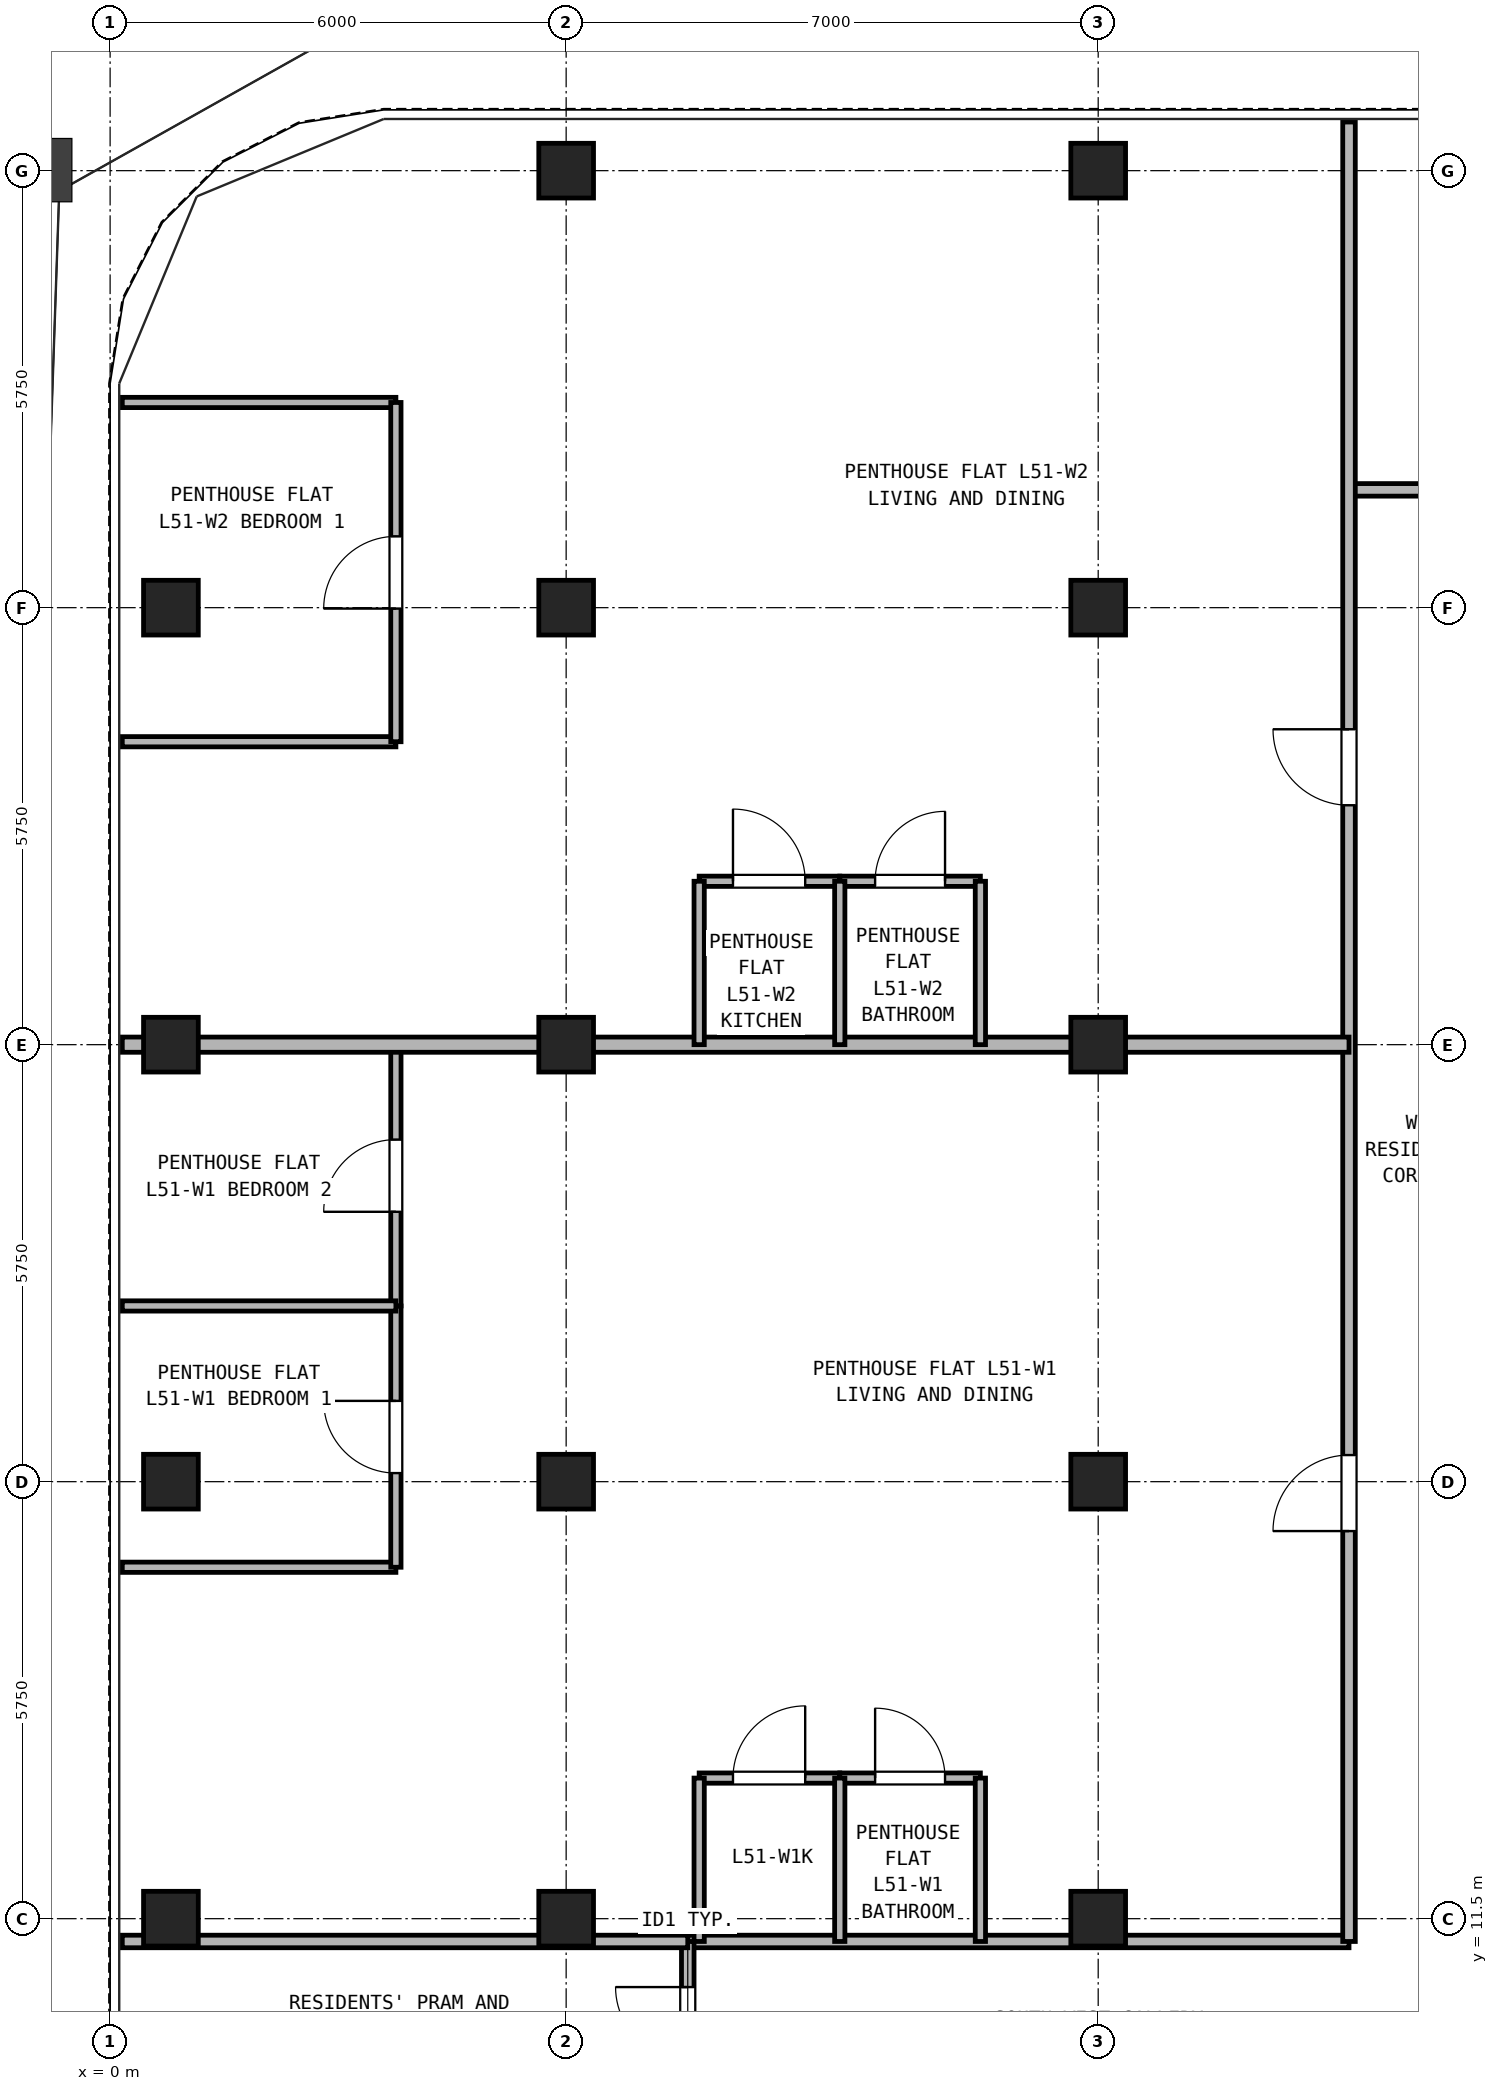
"""IFC4 building model, lengths in metres.
Left out: names, types, materials, properties, quantities, classifications, styles, units other than length and angle.
Written with IfcOpenShell. Run it as: python <this file> out.ifc"""

import sys

from ifc_helpers import new_model, si_unit, direction, frame, frame_2d, origin, origin_2d, place, context, subcontext, project, spatial, rectangle, hollow_rectangle, extrude, source, transform, mapped, element, fill, save


model = new_model("IFC4")
c1 = context("Model", 3, precision=1e-05, world=origin(), true_north=direction((0.0, 1.0)))
c2 = subcontext(c1, "Body", "Model", "MODEL_VIEW")
j1 = project(units=[si_unit("LENGTHUNIT", "METRE"), si_unit("PLANEANGLEUNIT", "RADIAN")], contexts=[c1])
p1 = place(None, origin())
s1 = spatial("IfcSite", under=j1, at=p1, CompositionType="ELEMENT")
p2 = place(p1, origin())
s2 = spatial("IfcBuilding", under=s1, at=p2, CompositionType="ELEMENT")
p3 = place(p2, frame((0.0, 0.0, 181.7)))
s3 = spatial("IfcBuildingStorey", under=s2, at=p3, CompositionType="ELEMENT", Elevation=181.7)
m1 = source(origin(), c2, "Body", "SweptSolid", [
    extrude(hollow_rectangle(XDim=0.72, YDim=0.72, WallThickness=0.04, at=origin_2d()), origin(), (0.0, 0.0, 1.0), 2.95),
])
for number, where, z_axis, x_axis in (
    (1, (6.0, 34.5, 0.0), (0.0, 0.0, 1.0), (1.0, 0.0, 0.0)),
    (2, (13.0, 34.5, 0.0), (0.0, 0.0, 1.0), (1.0, 0.0, 0.0)),
    (3, (0.8, 11.5, 0.0), (0.0, 0.0, 1.0), (1.0, 0.0, 0.0)),
    (4, (0.8, 17.25, 0.0), (0.0, 0.0, 1.0), (1.0, 0.0, 0.0)),
    (5, (0.8, 23.0, 0.0), (0.0, 0.0, 1.0), (1.0, 0.0, 0.0)),
    (6, (0.8, 28.75, 0.0), (0.0, 0.0, 1.0), (1.0, 0.0, 0.0)),
    (7, (6.0, 11.5, 0.0), (0.0, 0.0, 1.0), (1.0, 0.0, 0.0)),
    (8, (6.0, 17.25, 0.0), (0.0, 0.0, 1.0), (1.0, 0.0, 0.0)),
    (9, (6.0, 23.0, 0.0), (0.0, 0.0, 1.0), (1.0, 0.0, 0.0)),
    (10, (6.0, 28.75, 0.0), (0.0, 0.0, 1.0), (1.0, 0.0, 0.0)),
    (11, (13.0, 11.5, 0.0), (0.0, 0.0, 1.0), (1.0, 0.0, 0.0)),
    (12, (13.0, 17.25, 0.0), (0.0, 0.0, 1.0), (1.0, 0.0, 0.0)),
    (13, (13.0, 23.0, 0.0), (0.0, 0.0, 1.0), (1.0, 0.0, 0.0)),
    (14, (13.0, 28.75, 0.0), (0.0, 0.0, 1.0), (1.0, 0.0, 0.0)),
):
    element("IfcColumn", number, at=place(p3, frame(where, z_axis=z_axis, x_axis=x_axis)), inside=s3, PredefinedType="COLUMN", context=c2, shape_type="MappedRepresentation", body=[
        mapped(m1, transform((0.0, 0.0, 0.0), x_axis=(1.0, 0.0, 0.0), y_axis=(0.0, 1.0, 0.0), z_axis=(0.0, 0.0, 1.0), scale=1.0)),
    ])
p4 = place(p3, frame((7.6, 11.2, 0.0), z_axis=(0.0, 0.0, 1.0), x_axis=(1.0, 0.0, 0.0)))
e15 = element("IfcWall", 15, at=p4, inside=s3, PredefinedType="PARTITIONING", context=c2, shape_type="SweptSolid", body=[
    extrude(rectangle(XDim=8.7, YDim=0.165, at=frame_2d((4.35, 0.0))), origin(), (0.0, 0.0, 1.0), 2.95),
])
p5 = place(p3, frame((7.6, 9.2, 0.0), z_axis=(0.0, 0.0, 1.0), x_axis=(0.0, 1.0, 0.0)))
e16 = element("IfcWall", 16, at=p5, inside=s3, PredefinedType="PARTITIONING", context=c2, shape_type="SweptSolid", body=[
    extrude(rectangle(XDim=2.0, YDim=0.165, at=frame_2d((1.0, 0.0))), origin(), (0.0, 0.0, 1.0), 2.95),
])
p6 = place(p5, frame((0.45, 0.0, 0.0)))
e17 = element("IfcOpeningElement", 17, at=p6, cuts=e16, PredefinedType="OPENING", context=c2, shape_type="SweptSolid", body=[
    extrude(rectangle(XDim=0.95, YDim=2.15, at=frame_2d((0.475, 1.075))), frame((0.0, 0.093, 0.0), z_axis=(0.0, -1.0, 0.0), x_axis=(1.0, 0.0, 0.0)), (0.0, 0.0, 1.0), 0.185),
])
p7 = place(p3, frame((16.3, 30.3, 0.0), z_axis=(0.0, 0.0, 1.0), x_axis=(1.0, 0.0, 0.0)))
e18 = element("IfcWall", 18, at=p7, inside=s3, PredefinedType="PARTITIONING", context=c2, shape_type="SweptSolid", body=[
    extrude(rectangle(XDim=14.4, YDim=0.165, at=frame_2d((7.2, 0.0))), origin(), (0.0, 0.0, 1.0), 2.95),
])
p8 = place(p7, frame((3.1, 0.0, 0.0)))
e19 = element("IfcOpeningElement", 19, at=p8, cuts=e18, PredefinedType="OPENING", context=c2, shape_type="SweptSolid", body=[
    extrude(rectangle(XDim=0.95, YDim=2.15, at=frame_2d((0.475, 1.075))), frame((0.0, 0.093, 0.0), z_axis=(0.0, -1.0, 0.0), x_axis=(1.0, 0.0, 0.0)), (0.0, 0.0, 1.0), 0.185),
])
p9 = place(p7, frame((8.0, 0.0, 0.0)))
e20 = element("IfcOpeningElement", 20, at=p9, cuts=e18, PredefinedType="OPENING", context=c2, shape_type="SweptSolid", body=[
    extrude(rectangle(XDim=0.95, YDim=2.15, at=frame_2d((0.475, 1.075))), frame((0.0, 0.093, 0.0), z_axis=(0.0, -1.0, 0.0), x_axis=(1.0, 0.0, 0.0)), (0.0, 0.0, 1.0), 0.185),
])
p10 = place(p7, frame((10.8, 0.0, 0.0)))
e21 = element("IfcOpeningElement", 21, at=p10, cuts=e18, PredefinedType="OPENING", context=c2, shape_type="SweptSolid", body=[
    extrude(rectangle(XDim=0.92, YDim=2.1, at=frame_2d((0.46, 1.05))), frame((0.0, 0.093, 0.0), z_axis=(0.0, -1.0, 0.0), x_axis=(1.0, 0.0, 0.0)), (0.0, 0.0, 1.0), 0.185),
])
p11 = place(p3, frame((16.3, 11.2, 0.0), z_axis=(0.0, 0.0, 1.0), x_axis=(0.0, 1.0, 0.0)))
e22 = element("IfcWall", 22, at=p11, inside=s3, PredefinedType="PARTITIONING", context=c2, shape_type="SweptSolid", body=[
    extrude(rectangle(XDim=23.94, YDim=0.165, at=frame_2d((11.97, 0.0))), origin(), (0.0, 0.0, 1.0), 2.95),
])
p12 = place(p11, frame((5.4, 0.0, 0.0)))
e23 = element("IfcOpeningElement", 23, at=p12, cuts=e22, PredefinedType="OPENING", context=c2, shape_type="SweptSolid", body=[
    extrude(rectangle(XDim=1.0, YDim=2.15, at=frame_2d((0.5, 1.075))), frame((0.0, 0.093, 0.0), z_axis=(0.0, -1.0, 0.0), x_axis=(1.0, 0.0, 0.0)), (0.0, 0.0, 1.0), 0.185),
])
p13 = place(p11, frame((14.95, 0.0, 0.0)))
e24 = element("IfcOpeningElement", 24, at=p13, cuts=e22, PredefinedType="OPENING", context=c2, shape_type="SweptSolid", body=[
    extrude(rectangle(XDim=1.0, YDim=2.15, at=frame_2d((0.5, 1.075))), frame((0.0, 0.093, 0.0), z_axis=(0.0, -1.0, 0.0), x_axis=(1.0, 0.0, 0.0)), (0.0, 0.0, 1.0), 0.185),
])
p14 = place(p3, frame((0.16, 11.2, 0.0), z_axis=(0.0, 0.0, 1.0), x_axis=(1.0, 0.0, 0.0)))
e25 = element("IfcWall", 25, at=p14, inside=s3, PredefinedType="PARTITIONING", context=c2, shape_type="SweptSolid", body=[
    extrude(rectangle(XDim=7.44, YDim=0.165, at=frame_2d((3.72, 0.0))), origin(), (0.0, 0.0, 1.0), 2.95),
])
p15 = place(p3, frame((7.75, 13.35, 0.0), z_axis=(0.0, 0.0, 1.0), x_axis=(1.0, 0.0, 0.0)))
e26 = element("IfcWall", 26, at=p15, inside=s3, PredefinedType="PARTITIONING", context=c2, shape_type="SweptSolid", body=[
    extrude(rectangle(XDim=1.85, YDim=0.135, at=frame_2d((0.925, 0.0))), origin(), (0.0, 0.0, 1.0), 2.95),
])
p16 = place(p15, frame((0.445, 0.0, 0.0)))
e27 = element("IfcOpeningElement", 27, at=p16, cuts=e26, PredefinedType="OPENING", context=c2, shape_type="SweptSolid", body=[
    extrude(rectangle(XDim=0.95, YDim=2.15, at=frame_2d((0.475, 1.075))), frame((0.0, 0.077, 0.0), z_axis=(0.0, -1.0, 0.0), x_axis=(1.0, 0.0, 0.0)), (0.0, 0.0, 1.0), 0.155),
])
p17 = place(p3, frame((9.6, 13.35, 0.0), z_axis=(0.0, 0.0, 1.0), x_axis=(1.0, 0.0, 0.0)))
e28 = element("IfcWall", 28, at=p17, inside=s3, PredefinedType="PARTITIONING", context=c2, shape_type="SweptSolid", body=[
    extrude(rectangle(XDim=1.85, YDim=0.135, at=frame_2d((0.925, 0.0))), origin(), (0.0, 0.0, 1.0), 2.95),
])
p18 = place(p17, frame((0.465, 0.0, 0.0)))
e29 = element("IfcOpeningElement", 29, at=p18, cuts=e28, PredefinedType="OPENING", context=c2, shape_type="SweptSolid", body=[
    extrude(rectangle(XDim=0.92, YDim=2.1, at=frame_2d((0.46, 1.05))), frame((0.0, 0.077, 0.0), z_axis=(0.0, -1.0, 0.0), x_axis=(1.0, 0.0, 0.0)), (0.0, 0.0, 1.0), 0.155),
])
for number, where, z_axis, x_axis in (
    (30, (7.75, 11.2, 0.0), (0.0, 0.0, 1.0), (0.0, 1.0, 0.0)),
    (31, (9.6, 11.2, 0.0), (0.0, 0.0, 1.0), (0.0, 1.0, 0.0)),
    (32, (11.45, 11.2, 0.0), (0.0, 0.0, 1.0), (0.0, 1.0, 0.0)),
):
    element("IfcWall", number, at=place(p3, frame(where, z_axis=z_axis, x_axis=x_axis)), inside=s3, PredefinedType="PARTITIONING", context=c2, shape_type="SweptSolid", body=[
        extrude(rectangle(XDim=2.15, YDim=0.135, at=frame_2d((1.075, 0.0))), origin(), (0.0, 0.0, 1.0), 2.95),
    ])
p19 = place(p3, frame((0.16, 16.124, 0.0), z_axis=(0.0, 0.0, 1.0), x_axis=(1.0, 0.0, 0.0)))
e33 = element("IfcWall", 33, at=p19, inside=s3, PredefinedType="PARTITIONING", context=c2, shape_type="SweptSolid", body=[
    extrude(rectangle(XDim=3.6, YDim=0.135, at=frame_2d((1.8, 0.0))), origin(), (0.0, 0.0, 1.0), 2.95),
])
p20 = place(p3, frame((3.76, 16.124, 0.0), z_axis=(0.0, 0.0, 1.0), x_axis=(0.0, 1.0, 0.0)))
e34 = element("IfcWall", 34, at=p20, inside=s3, PredefinedType="PARTITIONING", context=c2, shape_type="SweptSolid", body=[
    extrude(rectangle(XDim=3.438, YDim=0.135, at=frame_2d((1.719, 0.0))), origin(), (0.0, 0.0, 1.0), 2.95),
])
p21 = place(p20, frame((1.239, 0.0, 0.0)))
e35 = element("IfcOpeningElement", 35, at=p21, cuts=e34, PredefinedType="OPENING", context=c2, shape_type="SweptSolid", body=[
    extrude(rectangle(XDim=0.95, YDim=2.15, at=frame_2d((0.475, 1.075))), frame((0.0, 0.077, 0.0), z_axis=(0.0, -1.0, 0.0), x_axis=(1.0, 0.0, 0.0)), (0.0, 0.0, 1.0), 0.155),
])
p22 = place(p3, frame((3.76, 19.562, 0.0), z_axis=(0.0, 0.0, 1.0), x_axis=(0.0, 1.0, 0.0)))
e36 = element("IfcWall", 36, at=p22, inside=s3, PredefinedType="PARTITIONING", context=c2, shape_type="SweptSolid", body=[
    extrude(rectangle(XDim=3.438, YDim=0.135, at=frame_2d((1.719, 0.0))), origin(), (0.0, 0.0, 1.0), 2.95),
])
p23 = place(p22, frame((1.239, 0.0, 0.0)))
e37 = element("IfcOpeningElement", 37, at=p23, cuts=e36, PredefinedType="OPENING", context=c2, shape_type="SweptSolid", body=[
    extrude(rectangle(XDim=0.95, YDim=2.15, at=frame_2d((0.475, 1.075))), frame((0.0, 0.077, 0.0), z_axis=(0.0, -1.0, 0.0), x_axis=(1.0, 0.0, 0.0)), (0.0, 0.0, 1.0), 0.155),
])
p24 = place(p3, frame((0.16, 19.562, 0.0), z_axis=(0.0, 0.0, 1.0), x_axis=(1.0, 0.0, 0.0)))
e38 = element("IfcWall", 38, at=p24, inside=s3, PredefinedType="PARTITIONING", context=c2, shape_type="SweptSolid", body=[
    extrude(rectangle(XDim=3.6, YDim=0.135, at=frame_2d((1.8, 0.0))), origin(), (0.0, 0.0, 1.0), 2.95),
])
p25 = place(p3, frame((0.16, 23.0, 0.0), z_axis=(0.0, 0.0, 1.0), x_axis=(1.0, 0.0, 0.0)))
e39 = element("IfcWall", 39, at=p25, inside=s3, PredefinedType="PARTITIONING", context=c2, shape_type="SweptSolid", body=[
    extrude(rectangle(XDim=16.14, YDim=0.2, at=frame_2d((8.07, 0.0))), origin(), (0.0, 0.0, 1.0), 2.323),
])
p26 = place(p3, frame((7.75, 25.15, 0.0), z_axis=(0.0, 0.0, 1.0), x_axis=(1.0, 0.0, 0.0)))
e40 = element("IfcWall", 40, at=p26, inside=s3, PredefinedType="PARTITIONING", context=c2, shape_type="SweptSolid", body=[
    extrude(rectangle(XDim=1.85, YDim=0.135, at=frame_2d((0.925, 0.0))), origin(), (0.0, 0.0, 1.0), 2.95),
])
p27 = place(p26, frame((0.445, 0.0, 0.0)))
e41 = element("IfcOpeningElement", 41, at=p27, cuts=e40, PredefinedType="OPENING", context=c2, shape_type="SweptSolid", body=[
    extrude(rectangle(XDim=0.95, YDim=2.15, at=frame_2d((0.475, 1.075))), frame((0.0, 0.077, 0.0), z_axis=(0.0, -1.0, 0.0), x_axis=(1.0, 0.0, 0.0)), (0.0, 0.0, 1.0), 0.155),
])
p28 = place(p3, frame((9.6, 25.15, 0.0), z_axis=(0.0, 0.0, 1.0), x_axis=(1.0, 0.0, 0.0)))
e42 = element("IfcWall", 42, at=p28, inside=s3, PredefinedType="PARTITIONING", context=c2, shape_type="SweptSolid", body=[
    extrude(rectangle(XDim=1.85, YDim=0.135, at=frame_2d((0.925, 0.0))), origin(), (0.0, 0.0, 1.0), 2.95),
])
p29 = place(p28, frame((0.465, 0.0, 0.0)))
e43 = element("IfcOpeningElement", 43, at=p29, cuts=e42, PredefinedType="OPENING", context=c2, shape_type="SweptSolid", body=[
    extrude(rectangle(XDim=0.92, YDim=2.1, at=frame_2d((0.46, 1.05))), frame((0.0, 0.077, 0.0), z_axis=(0.0, -1.0, 0.0), x_axis=(1.0, 0.0, 0.0)), (0.0, 0.0, 1.0), 0.155),
])
for number, where, z_axis, x_axis in (
    (44, (7.75, 23.0, 0.0), (0.0, 0.0, 1.0), (0.0, 1.0, 0.0)),
    (45, (9.6, 23.0, 0.0), (0.0, 0.0, 1.0), (0.0, 1.0, 0.0)),
    (46, (11.45, 23.0, 0.0), (0.0, 0.0, 1.0), (0.0, 1.0, 0.0)),
):
    element("IfcWall", number, at=place(p3, frame(where, z_axis=z_axis, x_axis=x_axis)), inside=s3, PredefinedType="PARTITIONING", context=c2, shape_type="SweptSolid", body=[
        extrude(rectangle(XDim=2.15, YDim=0.135, at=frame_2d((1.075, 0.0))), origin(), (0.0, 0.0, 1.0), 2.95),
    ])
for number, where, z_axis, x_axis in (
    (47, (0.16, 26.986, 0.0), (0.0, 0.0, 1.0), (1.0, 0.0, 0.0)),
    (48, (0.16, 31.45, 0.0), (0.0, 0.0, 1.0), (1.0, 0.0, 0.0)),
):
    element("IfcWall", number, at=place(p3, frame(where, z_axis=z_axis, x_axis=x_axis)), inside=s3, PredefinedType="PARTITIONING", context=c2, shape_type="SweptSolid", body=[
        extrude(rectangle(XDim=3.6, YDim=0.135, at=frame_2d((1.8, 0.0))), origin(), (0.0, 0.0, 1.0), 2.95),
    ])
p30 = place(p3, frame((3.76, 26.986, 0.0), z_axis=(0.0, 0.0, 1.0), x_axis=(0.0, 1.0, 0.0)))
e49 = element("IfcWall", 49, at=p30, inside=s3, PredefinedType="PARTITIONING", context=c2, shape_type="SweptSolid", body=[
    extrude(rectangle(XDim=4.464, YDim=0.135, at=frame_2d((2.232, 0.0))), origin(), (0.0, 0.0, 1.0), 2.95),
])
p31 = place(p30, frame((1.752, 0.0, 0.0)))
e50 = element("IfcOpeningElement", 50, at=p31, cuts=e49, PredefinedType="OPENING", context=c2, shape_type="SweptSolid", body=[
    extrude(rectangle(XDim=0.95, YDim=2.15, at=frame_2d((0.475, 1.075))), frame((0.0, 0.077, 0.0), z_axis=(0.0, -1.0, 0.0), x_axis=(1.0, 0.0, 0.0)), (0.0, 0.0, 1.0), 0.155),
])
p32 = place(p6, frame((0.95, 0.0, 0.0), z_axis=(0.0, 0.0, 1.0), x_axis=(-1.0, 0.0, 0.0)))
e51 = element("IfcDoor", 51, at=p32, inside=s3, OperationType="SINGLE_SWING_RIGHT", PredefinedType="DOOR", context=c2, shape_type="SweptSolid", body=[
    extrude(rectangle(XDim=0.95, YDim=2.15, at=frame_2d((0.475, 1.075))), frame((0.0, 0.025, 0.0), z_axis=(0.0, -1.0, 0.0), x_axis=(1.0, 0.0, 0.0)), (0.0, 0.0, 1.0), 0.05),
])
fill(e17, e51)
p33 = place(p16, origin())
e52 = element("IfcDoor", 52, at=p33, inside=s3, OperationType="SINGLE_SWING_RIGHT", PredefinedType="DOOR", context=c2, shape_type="SweptSolid", body=[
    extrude(rectangle(XDim=0.95, YDim=2.15, at=frame_2d((0.475, 1.075))), frame((0.0, 0.025, 0.0), z_axis=(0.0, -1.0, 0.0), x_axis=(1.0, 0.0, 0.0)), (0.0, 0.0, 1.0), 0.05),
])
fill(e27, e52)
p34 = place(p18, origin())
e53 = element("IfcDoor", 53, at=p34, inside=s3, OperationType="SINGLE_SWING_LEFT", PredefinedType="DOOR", context=c2, shape_type="SweptSolid", body=[
    extrude(rectangle(XDim=0.92, YDim=2.1, at=frame_2d((0.46, 1.05))), frame((0.0, 0.025, 0.0), z_axis=(0.0, -1.0, 0.0), x_axis=(1.0, 0.0, 0.0)), (0.0, 0.0, 1.0), 0.05),
])
fill(e29, e53)
p35 = place(p21, origin())
e54 = element("IfcDoor", 54, at=p35, inside=s3, OperationType="SINGLE_SWING_RIGHT", PredefinedType="DOOR", context=c2, shape_type="SweptSolid", body=[
    extrude(rectangle(XDim=0.95, YDim=2.15, at=frame_2d((0.475, 1.075))), frame((0.0, 0.025, 0.0), z_axis=(0.0, -1.0, 0.0), x_axis=(1.0, 0.0, 0.0)), (0.0, 0.0, 1.0), 0.05),
])
fill(e35, e54)
p36 = place(p23, origin())
e55 = element("IfcDoor", 55, at=p36, inside=s3, OperationType="SINGLE_SWING_LEFT", PredefinedType="DOOR", context=c2, shape_type="SweptSolid", body=[
    extrude(rectangle(XDim=0.95, YDim=2.15, at=frame_2d((0.475, 1.075))), frame((0.0, 0.025, 0.0), z_axis=(0.0, -1.0, 0.0), x_axis=(1.0, 0.0, 0.0)), (0.0, 0.0, 1.0), 0.05),
])
fill(e37, e55)
p37 = place(p12, origin())
e56 = element("IfcDoor", 56, at=p37, inside=s3, OperationType="SINGLE_SWING_LEFT", PredefinedType="DOOR", context=c2, shape_type="SweptSolid", body=[
    extrude(rectangle(XDim=1.0, YDim=2.15, at=frame_2d((0.5, 1.075))), frame((0.0, 0.025, 0.0), z_axis=(0.0, -1.0, 0.0), x_axis=(1.0, 0.0, 0.0)), (0.0, 0.0, 1.0), 0.05),
])
fill(e23, e56)
p38 = place(p27, origin())
e57 = element("IfcDoor", 57, at=p38, inside=s3, OperationType="SINGLE_SWING_LEFT", PredefinedType="DOOR", context=c2, shape_type="SweptSolid", body=[
    extrude(rectangle(XDim=0.95, YDim=2.15, at=frame_2d((0.475, 1.075))), frame((0.0, 0.025, 0.0), z_axis=(0.0, -1.0, 0.0), x_axis=(1.0, 0.0, 0.0)), (0.0, 0.0, 1.0), 0.05),
])
fill(e41, e57)
p39 = place(p29, origin())
e58 = element("IfcDoor", 58, at=p39, inside=s3, OperationType="SINGLE_SWING_RIGHT", PredefinedType="DOOR", context=c2, shape_type="SweptSolid", body=[
    extrude(rectangle(XDim=0.92, YDim=2.1, at=frame_2d((0.46, 1.05))), frame((0.0, 0.025, 0.0), z_axis=(0.0, -1.0, 0.0), x_axis=(1.0, 0.0, 0.0)), (0.0, 0.0, 1.0), 0.05),
])
fill(e43, e58)
p40 = place(p31, origin())
e59 = element("IfcDoor", 59, at=p40, inside=s3, OperationType="SINGLE_SWING_LEFT", PredefinedType="DOOR", context=c2, shape_type="SweptSolid", body=[
    extrude(rectangle(XDim=0.95, YDim=2.15, at=frame_2d((0.475, 1.075))), frame((0.0, 0.025, 0.0), z_axis=(0.0, -1.0, 0.0), x_axis=(1.0, 0.0, 0.0)), (0.0, 0.0, 1.0), 0.05),
])
fill(e50, e59)
p41 = place(p13, origin())
e60 = element("IfcDoor", 60, at=p41, inside=s3, OperationType="SINGLE_SWING_RIGHT", PredefinedType="DOOR", context=c2, shape_type="SweptSolid", body=[
    extrude(rectangle(XDim=1.0, YDim=2.15, at=frame_2d((0.5, 1.075))), frame((0.0, 0.025, 0.0), z_axis=(0.0, -1.0, 0.0), x_axis=(1.0, 0.0, 0.0)), (0.0, 0.0, 1.0), 0.05),
])
fill(e24, e60)
save(model, sys.argv[1])
